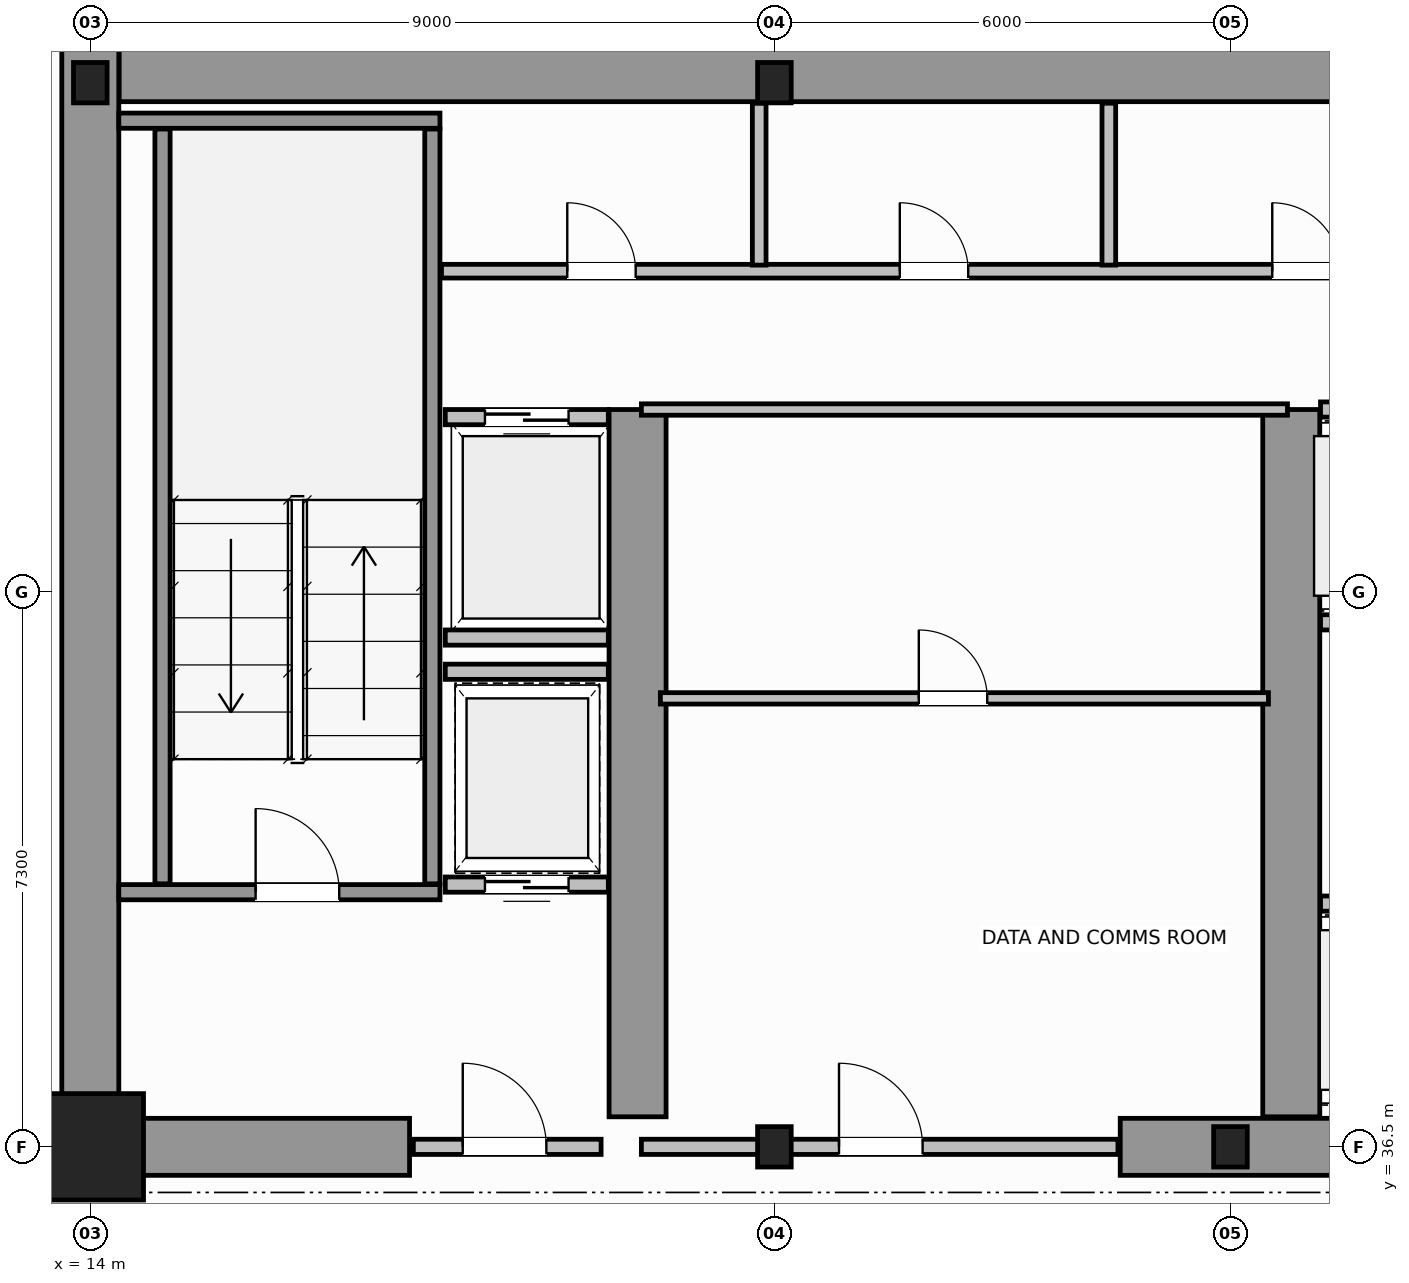
"""IFC4 building model, lengths in metres.
Left out: names, types, materials, properties, quantities, classifications, styles, units other than length and angle.
Written with IfcOpenShell. Run it as: python <this file> out.ifc"""

import sys

from ifc_helpers import new_model, si_unit, direction, frame, frame_2d, origin, origin_2d, place, context, subcontext, project, spatial, rectangle, i_section, extrude, source, transform, mapped, element, fill, save


model = new_model("IFC4")
c1 = context("Model", 3, precision=1e-05, world=origin(), true_north=direction((0.0, 1.0)))
c2 = subcontext(c1, "Body", "Model", "MODEL_VIEW")
j1 = project(units=[si_unit("LENGTHUNIT", "METRE"), si_unit("PLANEANGLEUNIT", "RADIAN")], contexts=[c1])
p1 = place(None, origin())
s1 = spatial("IfcSite", under=j1, at=p1, CompositionType="ELEMENT")
p2 = place(p1, origin())
s2 = spatial("IfcBuilding", under=s1, at=p2, CompositionType="ELEMENT")
p3 = place(p2, frame((0.0, 0.0, 126.2)))
s3 = spatial("IfcBuildingStorey", under=s2, at=p3, CompositionType="ELEMENT", Elevation=126.2)
m1 = source(origin(), c2, "Body", "SweptSolid", [
    extrude(rectangle(XDim=1.4, YDim=1.4, at=origin_2d()), origin(), (0.0, 0.0, 1.0), 3.8),
])
p4 = place(p3, frame((14.0, 36.5, 0.0), z_axis=(0.0, 0.0, 1.0), x_axis=(1.0, 0.0, 0.0)))
e1 = element("IfcColumn", 1, at=p4, inside=s3, PredefinedType="COLUMN", context=c2, shape_type="MappedRepresentation", body=[
    mapped(m1, transform((0.0, 0.0, 0.0), scale=1.0)),
])
m2 = source(origin(), c2, "Body", "SweptSolid", [
    extrude(i_section(OverallWidth=0.442, OverallDepth=0.531, WebThickness=0.065, FlangeThickness=0.076, FilletRadius=0.015, at=origin_2d()), origin(), (0.0, 0.0, 1.0), 3.8),
])
for number, where, z_axis, x_axis in (
    (2, (23.0, 36.5, 0.0), (0.0, 0.0, 1.0), (1.0, 0.0, 0.0)),
    (3, (29.0, 36.5, 0.0), (0.0, 0.0, 1.0), (1.0, 0.0, 0.0)),
    (4, (14.0, 50.5, 0.0), (0.0, 0.0, 1.0), (1.0, 0.0, 0.0)),
    (5, (23.0, 50.5, 0.0), (0.0, 0.0, 1.0), (1.0, 0.0, 0.0)),
):
    element("IfcColumn", number, at=place(p3, frame(where, z_axis=z_axis, x_axis=x_axis)), inside=s3, PredefinedType="COLUMN", context=c2, shape_type="MappedRepresentation", body=[
        mapped(m2, transform((0.0, 0.0, 0.0), scale=1.0)),
    ])
p5 = place(p3, frame((14.379, 50.625, 0.0), z_axis=(0.0, 0.0, 1.0), x_axis=(1.0, 0.0, 0.0)))
e6 = element("IfcWall", 6, at=p5, inside=s3, PredefinedType="SHEAR", context=c2, shape_type="SweptSolid", body=[
    extrude(rectangle(XDim=19.619, YDim=0.75, at=frame_2d((9.81, 0.0))), origin(), (0.0, 0.0, 1.0), 3.8),
])
p6 = place(p3, frame((14.0, 36.5, 0.0), z_axis=(0.0, 0.0, 1.0), x_axis=(0.0, 1.0, 0.0)))
e7 = element("IfcWall", 7, at=p6, inside=s3, PredefinedType="SHEAR", context=c2, shape_type="SweptSolid", body=[
    extrude(rectangle(XDim=14.5, YDim=0.75, at=frame_2d((7.25, 0.0))), origin(), (0.0, 0.0, 1.0), 3.8),
])
p7 = place(p3, frame((14.395, 36.5, 0.0), z_axis=(0.0, 0.0, 1.0), x_axis=(1.0, 0.0, 0.0)))
e8 = element("IfcWall", 8, at=p7, inside=s3, PredefinedType="SHEAR", context=c2, shape_type="SweptSolid", body=[
    extrude(rectangle(XDim=3.805, YDim=0.75, at=frame_2d((1.902, 0.0))), origin(), (0.0, 0.0, 1.0), 2.38),
])
p8 = place(p3, frame((27.55, 36.5, 0.0), z_axis=(0.0, 0.0, 1.0), x_axis=(1.0, 0.0, 0.0)))
e9 = element("IfcWall", 9, at=p8, inside=s3, PredefinedType="SHEAR", context=c2, shape_type="SweptSolid", body=[
    extrude(rectangle(XDim=4.5, YDim=0.75, at=frame_2d((2.25, 0.0))), origin(), (0.0, 0.0, 1.0), 3.8),
])
for number, where, z_axis, x_axis in (
    (10, (21.2, 36.895, 0.0), (0.0, 0.0, 1.0), (0.0, 1.0, 0.0)),
    (11, (29.8, 36.895, 0.0), (0.0, 0.0, 1.0), (0.0, 1.0, 0.0)),
):
    element("IfcWall", number, at=place(p3, frame(where, z_axis=z_axis, x_axis=x_axis)), inside=s3, PredefinedType="SHEAR", context=c2, shape_type="SweptSolid", body=[
        extrude(rectangle(XDim=9.305, YDim=0.75, at=frame_2d((4.652, 0.0))), origin(), (0.0, 0.0, 1.0), 3.8),
    ])
p9 = place(p3, frame((14.375, 39.85, 0.0), z_axis=(0.0, 0.0, 1.0), x_axis=(1.0, 0.0, 0.0)))
e12 = element("IfcWall", 12, at=p9, inside=s3, PredefinedType="SOLIDWALL", context=c2, shape_type="SweptSolid", body=[
    extrude(rectangle(XDim=4.225, YDim=0.2, at=frame_2d((2.113, 0.0))), origin(), (0.0, 0.0, 1.0), 3.8),
])
p10 = place(p9, frame((1.8, 0.0, 0.0)))
e13 = element("IfcOpeningElement", 13, at=p10, cuts=e12, PredefinedType="OPENING", context=c2, shape_type="SweptSolid", body=[
    extrude(rectangle(XDim=1.1, YDim=2.15, at=frame_2d((0.55, 1.075))), frame((0.0, 0.11, 0.0), z_axis=(0.0, -1.0, 0.0), x_axis=(1.0, 0.0, 0.0)), (0.0, 0.0, 1.0), 0.22),
])
p11 = place(p3, frame((14.375, 50.0, 0.0), z_axis=(0.0, 0.0, 1.0), x_axis=(1.0, 0.0, 0.0)))
e14 = element("IfcWall", 14, at=p11, inside=s3, PredefinedType="SOLIDWALL", context=c2, shape_type="SweptSolid", body=[
    extrude(rectangle(XDim=4.225, YDim=0.2, at=frame_2d((2.113, 0.0))), origin(), (0.0, 0.0, 1.0), 3.8),
])
for number, where, z_axis, x_axis in (
    (15, (14.95, 39.96, 0.0), (0.0, 0.0, 1.0), (0.0, 1.0, 0.0)),
    (16, (18.5, 39.96, 0.0), (0.0, 0.0, 1.0), (0.0, 1.0, 0.0)),
):
    element("IfcWall", number, at=place(p3, frame(where, z_axis=z_axis, x_axis=x_axis)), inside=s3, PredefinedType="SOLIDWALL", context=c2, shape_type="SweptSolid", body=[
        extrude(rectangle(XDim=9.93, YDim=0.2, at=frame_2d((4.965, 0.0))), origin(), (0.0, 0.0, 1.0), 3.8),
    ])
p12 = place(p3, frame((18.25, 36.5, 0.0), z_axis=(0.0, 0.0, 1.0), x_axis=(1.0, 0.0, 0.0)))
e17 = element("IfcWall", 17, at=p12, inside=s3, PredefinedType="SOLIDWALL", context=c2, shape_type="SweptSolid", body=[
    extrude(rectangle(XDim=2.47, YDim=0.2, at=frame_2d((1.235, 0.0))), origin(), (0.0, 0.0, 1.0), 2.37),
])
p13 = place(p12, frame((0.65, 0.0, 0.0)))
e18 = element("IfcOpeningElement", 18, at=p13, cuts=e17, PredefinedType="OPENING", context=c2, shape_type="SweptSolid", body=[
    extrude(rectangle(XDim=1.1, YDim=2.15, at=frame_2d((0.55, 1.075))), frame((0.0, 0.11, 0.0), z_axis=(0.0, -1.0, 0.0), x_axis=(1.0, 0.0, 0.0)), (0.0, 0.0, 1.0), 0.22),
])
p14 = place(p3, frame((30.185, 39.7, 0.0), z_axis=(0.0, 0.0, 1.0), x_axis=(1.0, 0.0, 0.0)))
e19 = element("IfcWall", 19, at=p14, inside=s3, PredefinedType="SOLIDWALL", context=c2, shape_type="SweptSolid", body=[
    extrude(rectangle(XDim=1.845, YDim=0.2, at=frame_2d((0.922, 0.0))), origin(), (0.0, 0.0, 1.0), 3.58),
])
p15 = place(p14, frame((0.373, 0.0, 0.0)))
e20 = element("IfcOpeningElement", 20, at=p15, cuts=e19, PredefinedType="OPENING", context=c2, shape_type="SweptSolid", body=[
    extrude(rectangle(XDim=1.1, YDim=2.15, at=frame_2d((0.55, 1.075))), frame((0.0, 0.11, 0.0), z_axis=(0.0, -1.0, 0.0), x_axis=(1.0, 0.0, 0.0)), (0.0, 0.0, 1.0), 0.22),
])
p16 = place(p3, frame((30.185, 43.4, 0.0), z_axis=(0.0, 0.0, 1.0), x_axis=(1.0, 0.0, 0.0)))
e21 = element("IfcWall", 21, at=p16, inside=s3, PredefinedType="SOLIDWALL", context=c2, shape_type="SweptSolid", body=[
    extrude(rectangle(XDim=1.725, YDim=0.2, at=frame_2d((0.862, 0.0))), origin(), (0.0, 0.0, 1.0), 3.58),
])
p17 = place(p16, frame((0.313, 0.0, 0.0)))
e22 = element("IfcOpeningElement", 22, at=p17, cuts=e21, PredefinedType="OPENING", context=c2, shape_type="SweptSolid", body=[
    extrude(rectangle(XDim=1.1, YDim=2.15, at=frame_2d((0.55, 1.075))), frame((0.0, 0.11, 0.0), z_axis=(0.0, -1.0, 0.0), x_axis=(1.0, 0.0, 0.0)), (0.0, 0.0, 1.0), 0.22),
])
p18 = place(p3, frame((30.185, 46.2, 0.0), z_axis=(0.0, 0.0, 1.0), x_axis=(1.0, 0.0, 0.0)))
e23 = element("IfcWall", 23, at=p18, inside=s3, PredefinedType="SOLIDWALL", context=c2, shape_type="SweptSolid", body=[
    extrude(rectangle(XDim=1.725, YDim=0.2, at=frame_2d((0.862, 0.0))), origin(), (0.0, 0.0, 1.0), 3.58),
])
p19 = place(p3, frame((18.67, 46.1, 0.0), z_axis=(0.0, 0.0, 1.0), x_axis=(1.0, 0.0, 0.0)))
e24 = element("IfcWall", 24, at=p19, inside=s3, PredefinedType="SOLIDWALL", context=c2, shape_type="SweptSolid", body=[
    extrude(rectangle(XDim=2.145, YDim=0.2, at=frame_2d((1.073, 0.0))), origin(), (0.0, 0.0, 1.0), 3.58),
])
p20 = place(p19, frame((0.522, 0.0, 0.0)))
e25 = element("IfcOpeningElement", 25, at=p20, cuts=e24, PredefinedType="OPENING", context=c2, shape_type="SweptSolid", body=[
    extrude(rectangle(XDim=1.1, YDim=2.15, at=frame_2d((0.55, 1.075))), frame((0.0, 0.11, 0.0), z_axis=(0.0, -1.0, 0.0), x_axis=(1.0, 0.0, 0.0)), (0.0, 0.0, 1.0), 0.22),
])
p21 = place(p3, frame((18.67, 43.2, 0.0), z_axis=(0.0, 0.0, 1.0), x_axis=(1.0, 0.0, 0.0)))
e26 = element("IfcWall", 26, at=p21, inside=s3, PredefinedType="SOLIDWALL", context=c2, shape_type="SweptSolid", body=[
    extrude(rectangle(XDim=2.145, YDim=0.2, at=frame_2d((1.073, 0.0))), origin(), (0.0, 0.0, 1.0), 3.58),
])
p22 = place(p3, frame((18.67, 39.95, 0.0), z_axis=(0.0, 0.0, 1.0), x_axis=(1.0, 0.0, 0.0)))
e27 = element("IfcWall", 27, at=p22, inside=s3, PredefinedType="SOLIDWALL", context=c2, shape_type="SweptSolid", body=[
    extrude(rectangle(XDim=2.145, YDim=0.2, at=frame_2d((1.073, 0.0))), origin(), (0.0, 0.0, 1.0), 3.58),
])
p23 = place(p22, frame((0.522, 0.0, 0.0)))
e28 = element("IfcOpeningElement", 28, at=p23, cuts=e27, PredefinedType="OPENING", context=c2, shape_type="SweptSolid", body=[
    extrude(rectangle(XDim=1.1, YDim=2.15, at=frame_2d((0.55, 1.075))), frame((0.0, 0.11, 0.0), z_axis=(0.0, -1.0, 0.0), x_axis=(1.0, 0.0, 0.0)), (0.0, 0.0, 1.0), 0.22),
])
p24 = place(p3, frame((18.67, 42.75, 0.0), z_axis=(0.0, 0.0, 1.0), x_axis=(1.0, 0.0, 0.0)))
e29 = element("IfcWall", 29, at=p24, inside=s3, PredefinedType="SOLIDWALL", context=c2, shape_type="SweptSolid", body=[
    extrude(rectangle(XDim=2.145, YDim=0.2, at=frame_2d((1.073, 0.0))), origin(), (0.0, 0.0, 1.0), 3.58),
])
p25 = place(p3, frame((21.25, 36.5, 0.0), z_axis=(0.0, 0.0, 1.0), x_axis=(1.0, 0.0, 0.0)))
e30 = element("IfcWall", 30, at=p25, inside=s3, PredefinedType="SOLIDWALL", context=c2, shape_type="SweptSolid", body=[
    extrude(rectangle(XDim=6.27, YDim=0.2, at=frame_2d((3.135, 0.0))), origin(), (0.0, 0.0, 1.0), 2.37),
])
p26 = place(p25, frame((2.6, 0.0, 0.0)))
e31 = element("IfcOpeningElement", 31, at=p26, cuts=e30, PredefinedType="OPENING", context=c2, shape_type="SweptSolid", body=[
    extrude(rectangle(XDim=1.1, YDim=2.15, at=frame_2d((0.55, 1.075))), frame((0.0, 0.11, 0.0), z_axis=(0.0, -1.0, 0.0), x_axis=(1.0, 0.0, 0.0)), (0.0, 0.0, 1.0), 0.22),
])
p27 = place(p3, frame((21.25, 46.2, 0.0), z_axis=(0.0, 0.0, 1.0), x_axis=(1.0, 0.0, 0.0)))
e32 = element("IfcWall", 32, at=p27, inside=s3, PredefinedType="PARTITIONING", context=c2, shape_type="SweptSolid", body=[
    extrude(rectangle(XDim=8.5, YDim=0.15, at=frame_2d((4.25, 0.0))), origin(), (0.0, 0.0, 1.0), 3.58),
])
p28 = place(p3, frame((21.5, 42.4, 0.0), z_axis=(0.0, 0.0, 1.0), x_axis=(1.0, 0.0, 0.0)))
e33 = element("IfcWall", 33, at=p28, inside=s3, PredefinedType="PARTITIONING", context=c2, shape_type="SweptSolid", body=[
    extrude(rectangle(XDim=8.0, YDim=0.15, at=frame_2d((4.0, 0.0))), origin(), (0.0, 0.0, 1.0), 3.58),
])
p29 = place(p28, frame((3.4, 0.0, 0.0)))
e34 = element("IfcOpeningElement", 34, at=p29, cuts=e33, PredefinedType="OPENING", context=c2, shape_type="SweptSolid", body=[
    extrude(rectangle(XDim=0.9, YDim=2.1, at=frame_2d((0.45, 1.05))), frame((0.0, 0.085, 0.0), z_axis=(0.0, -1.0, 0.0), x_axis=(1.0, 0.0, 0.0)), (0.0, 0.0, 1.0), 0.17),
])
p30 = place(p3, frame((18.62, 48.02, 0.0), z_axis=(0.0, 0.0, 1.0), x_axis=(1.0, 0.0, 0.0)))
e35 = element("IfcWall", 35, at=p30, inside=s3, PredefinedType="PLUMBINGWALL", context=c2, shape_type="SweptSolid", body=[
    extrude(rectangle(XDim=30.76, YDim=0.18, at=frame_2d((15.38, 0.0))), origin(), (0.0, 0.0, 1.0), 3.58),
])
p31 = place(p30, frame((1.655, 0.0, 0.0)))
e36 = element("IfcOpeningElement", 36, at=p31, cuts=e35, PredefinedType="OPENING", context=c2, shape_type="SweptSolid", body=[
    extrude(rectangle(XDim=0.9, YDim=2.15, at=frame_2d((0.45, 1.075))), frame((0.0, 0.1, 0.0), z_axis=(0.0, -1.0, 0.0), x_axis=(1.0, 0.0, 0.0)), (0.0, 0.0, 1.0), 0.2),
])
p32 = place(p30, frame((6.03, 0.0, 0.0)))
e37 = element("IfcOpeningElement", 37, at=p32, cuts=e35, PredefinedType="OPENING", context=c2, shape_type="SweptSolid", body=[
    extrude(rectangle(XDim=0.9, YDim=2.15, at=frame_2d((0.45, 1.075))), frame((0.0, 0.1, 0.0), z_axis=(0.0, -1.0, 0.0), x_axis=(1.0, 0.0, 0.0)), (0.0, 0.0, 1.0), 0.2),
])
p33 = place(p30, frame((10.93, 0.0, 0.0)))
e38 = element("IfcOpeningElement", 38, at=p33, cuts=e35, PredefinedType="OPENING", context=c2, shape_type="SweptSolid", body=[
    extrude(rectangle(XDim=0.9, YDim=2.15, at=frame_2d((0.45, 1.075))), frame((0.0, 0.1, 0.0), z_axis=(0.0, -1.0, 0.0), x_axis=(1.0, 0.0, 0.0)), (0.0, 0.0, 1.0), 0.2),
])
p34 = place(p30, frame((16.13, 0.0, 0.0)))
e39 = element("IfcOpeningElement", 39, at=p34, cuts=e35, PredefinedType="OPENING", context=c2, shape_type="SweptSolid", body=[
    extrude(rectangle(XDim=0.9, YDim=2.15, at=frame_2d((0.45, 1.075))), frame((0.0, 0.1, 0.0), z_axis=(0.0, -1.0, 0.0), x_axis=(1.0, 0.0, 0.0)), (0.0, 0.0, 1.0), 0.2),
])
p35 = place(p30, frame((21.73, 0.0, 0.0)))
e40 = element("IfcOpeningElement", 40, at=p35, cuts=e35, PredefinedType="OPENING", context=c2, shape_type="SweptSolid", body=[
    extrude(rectangle(XDim=0.9, YDim=2.15, at=frame_2d((0.45, 1.075))), frame((0.0, 0.1, 0.0), z_axis=(0.0, -1.0, 0.0), x_axis=(1.0, 0.0, 0.0)), (0.0, 0.0, 1.0), 0.2),
])
p36 = place(p30, frame((27.505, 0.0, 0.0)))
e41 = element("IfcOpeningElement", 41, at=p36, cuts=e35, PredefinedType="OPENING", context=c2, shape_type="SweptSolid", body=[
    extrude(rectangle(XDim=0.9, YDim=2.15, at=frame_2d((0.45, 1.075))), frame((0.0, 0.1, 0.0), z_axis=(0.0, -1.0, 0.0), x_axis=(1.0, 0.0, 0.0)), (0.0, 0.0, 1.0), 0.2),
])
p37 = place(p3, frame((22.8, 48.1, 0.0), z_axis=(0.0, 0.0, 1.0), x_axis=(0.0, 1.0, 0.0)))
e42 = element("IfcWall", 42, at=p37, inside=s3, PredefinedType="PLUMBINGWALL", context=c2, shape_type="SweptSolid", body=[
    extrude(rectangle(XDim=2.13, YDim=0.18, at=frame_2d((1.065, 0.0))), origin(), (0.0, 0.0, 1.0), 2.87),
])
p38 = place(p3, frame((27.4, 48.1, 0.0), z_axis=(0.0, 0.0, 1.0), x_axis=(0.0, 1.0, 0.0)))
e43 = element("IfcWall", 43, at=p38, inside=s3, PredefinedType="PLUMBINGWALL", context=c2, shape_type="SweptSolid", body=[
    extrude(rectangle(XDim=2.13, YDim=0.18, at=frame_2d((1.065, 0.0))), origin(), (0.0, 0.0, 1.0), 3.58),
])
p39 = place(p3, frame((7.267, 36.48, 0.0), z_axis=(0.0, 0.0, 1.0), x_axis=(1.0, 0.0, 0.0)))
e44 = element("IfcWall", 44, at=p39, inside=s3, PredefinedType="PARTITIONING", context=c2, shape_type="SweptSolid", body=[
    extrude(rectangle(XDim=6.673, YDim=0.12, at=frame_2d((3.336, 0.0))), origin(), (0.0, 0.0, 1.0), 2.87),
])
p40 = place(p39, frame((2.887, 0.0, 0.0)))
e45 = element("IfcOpeningElement", 45, at=p40, cuts=e44, PredefinedType="OPENING", context=c2, shape_type="SweptSolid", body=[
    extrude(rectangle(XDim=0.9, YDim=2.15, at=frame_2d((0.45, 1.075))), frame((0.0, 0.07, 0.0), z_axis=(0.0, -1.0, 0.0), x_axis=(1.0, 0.0, 0.0)), (0.0, 0.0, 1.0), 0.14),
])
m3 = source(origin(), c2, "Body", "SweptSolid", [
    extrude(rectangle(XDim=1.1, YDim=2.15, at=frame_2d((0.55, 1.075))), frame((0.0, 0.025, 0.0), z_axis=(0.0, -1.0, 0.0), x_axis=(1.0, 0.0, 0.0)), (0.0, 0.0, 1.0), 0.05),
])
p41 = place(p10, origin())
e46 = element("IfcDoor", 46, at=p41, inside=s3, OperationType="SINGLE_SWING_LEFT", PredefinedType="DOOR", context=c2, shape_type="MappedRepresentation", body=[
    mapped(m3, transform((0.0, 0.0, 0.0), scale=1.0)),
])
fill(e13, e46)
p42 = place(p13, origin())
e47 = element("IfcDoor", 47, at=p42, inside=s3, OperationType="SINGLE_SWING_RIGHT", PredefinedType="DOOR", context=c2, shape_type="MappedRepresentation", body=[
    mapped(m3, transform((0.0, 0.0, 0.0), scale=1.0)),
])
fill(e18, e47)
p43 = place(p20, origin())
e48 = element("IfcDoor", 48, at=p43, inside=s3, OperationType="DOUBLE_DOOR_SLIDING", PredefinedType="DOOR", context=c2, shape_type="MappedRepresentation", body=[
    mapped(m3, transform((0.0, 0.0, 0.0), scale=1.0)),
])
fill(e25, e48)
p44 = place(p23, origin())
e49 = element("IfcDoor", 49, at=p44, inside=s3, OperationType="DOUBLE_DOOR_SLIDING", PredefinedType="DOOR", context=c2, shape_type="MappedRepresentation", body=[
    mapped(m3, transform((0.0, 0.0, 0.0), scale=1.0)),
])
fill(e28, e49)
p45 = place(p26, origin())
e50 = element("IfcDoor", 50, at=p45, inside=s3, OperationType="SINGLE_SWING_LEFT", PredefinedType="DOOR", context=c2, shape_type="MappedRepresentation", body=[
    mapped(m3, transform((0.0, 0.0, 0.0), scale=1.0)),
])
fill(e31, e50)
m4 = source(origin(), c2, "Body", "SweptSolid", [
    extrude(rectangle(XDim=0.9, YDim=2.1, at=frame_2d((0.45, 1.05))), frame((0.0, 0.025, 0.0), z_axis=(0.0, -1.0, 0.0), x_axis=(1.0, 0.0, 0.0)), (0.0, 0.0, 1.0), 0.05),
])
p46 = place(p29, origin())
e51 = element("IfcDoor", 51, at=p46, inside=s3, OperationType="SINGLE_SWING_RIGHT", PredefinedType="DOOR", context=c2, shape_type="MappedRepresentation", body=[
    mapped(m4, transform((0.0, 0.0, 0.0), scale=1.0)),
])
fill(e34, e51)
m5 = source(origin(), c2, "Body", "SweptSolid", [
    extrude(rectangle(XDim=0.9, YDim=2.15, at=frame_2d((0.45, 1.075))), frame((0.0, 0.025, 0.0), z_axis=(0.0, -1.0, 0.0), x_axis=(1.0, 0.0, 0.0)), (0.0, 0.0, 1.0), 0.05),
])
p47 = place(p31, origin())
e52 = element("IfcDoor", 52, at=p47, inside=s3, OperationType="SINGLE_SWING_LEFT", PredefinedType="DOOR", context=c2, shape_type="MappedRepresentation", body=[
    mapped(m5, transform((0.0, 0.0, 0.0), scale=1.0)),
])
fill(e36, e52)
p48 = place(p32, origin())
e53 = element("IfcDoor", 53, at=p48, inside=s3, OperationType="SINGLE_SWING_RIGHT", PredefinedType="DOOR", context=c2, shape_type="MappedRepresentation", body=[
    mapped(m5, transform((0.0, 0.0, 0.0), scale=1.0)),
])
fill(e37, e53)
p49 = place(p33, origin())
e54 = element("IfcDoor", 54, at=p49, inside=s3, OperationType="SINGLE_SWING_LEFT", PredefinedType="DOOR", context=c2, shape_type="MappedRepresentation", body=[
    mapped(m5, transform((0.0, 0.0, 0.0), scale=1.0)),
])
fill(e38, e54)
save(model, sys.argv[1])
